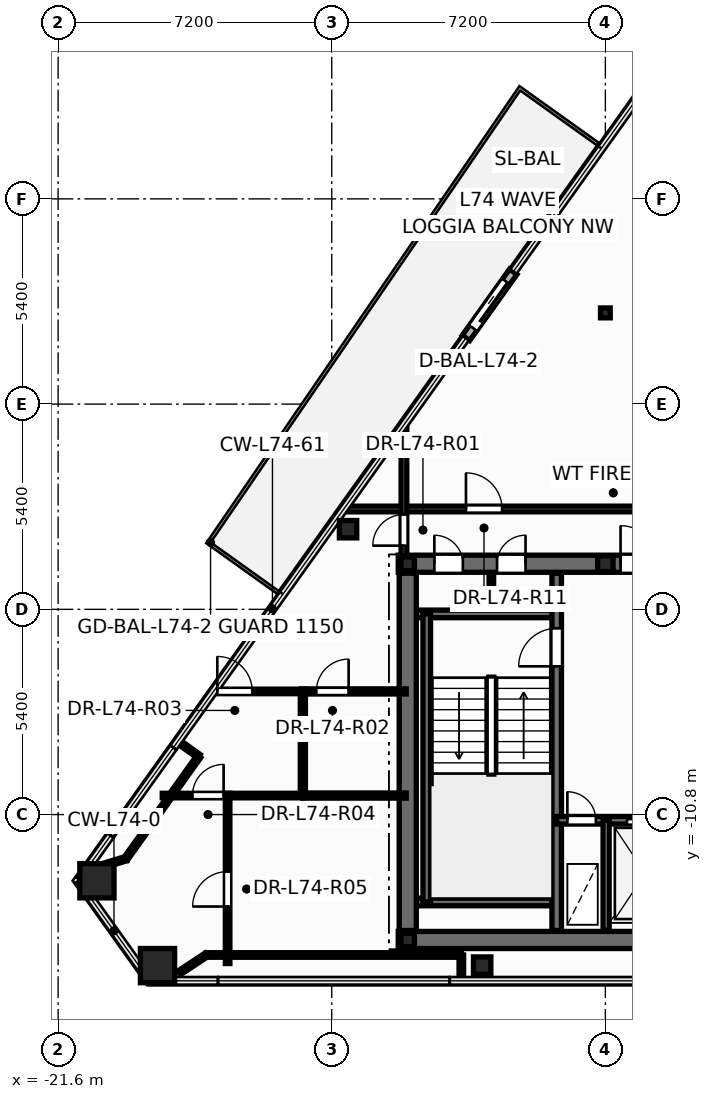
"""IFC4 building model, lengths in metres.
Left out: names, types, materials, properties, quantities, classifications, styles, units other than length and angle.
Written with IfcOpenShell. Run it as: python <this file> out.ifc"""

import sys

from ifc_helpers import new_model, si_unit, direction, frame, frame_2d, origin, origin_2d, place, context, subcontext, project, spatial, rectangle, hollow_rectangle, hollow_circle, i_section, extrude, element, fill, save


model = new_model("IFC4")
c1 = context("Model", 3, precision=1e-05, world=origin(), true_north=direction((0.0, 1.0)))
c2 = subcontext(c1, "Body", "Model", "MODEL_VIEW")
j1 = project(units=[si_unit("LENGTHUNIT", "METRE"), si_unit("PLANEANGLEUNIT", "RADIAN")], contexts=[c1])
p1 = place(None, origin())
s1 = spatial("IfcSite", under=j1, at=p1, CompositionType="ELEMENT")
p2 = place(p1, origin())
s2 = spatial("IfcBuilding", under=s1, at=p2, CompositionType="ELEMENT")
p3 = place(p2, frame((0.0, 0.0, 281.4)))
s3 = spatial("IfcBuildingStorey", under=s2, at=p3, CompositionType="ELEMENT", Elevation=281.4)
for number, where, z_axis, x_axis in (
    (1, (-20.579, -12.543, 0.0), (0.0, 0.0, 1.0), (1.0, 0.0, 0.0)),
    (2, (-18.985, -14.774, 0.0), (0.0, 0.0, 1.0), (1.0, 0.0, 0.0)),
):
    element("IfcColumn", number, at=place(p3, frame(where, z_axis=z_axis, x_axis=x_axis)), inside=s3, PredefinedType="COLUMN", context=c2, shape_type="SweptSolid", body=[
        extrude(hollow_rectangle(XDim=0.9, YDim=0.9, WallThickness=0.04, at=origin_2d()), origin(), (0.0, 0.0, 1.0), 3.6),
    ])
for number, where, z_axis, x_axis in (
    (3, (-10.442, -14.774, 0.0), (0.0, 0.0, 1.0), (1.0, 0.0, 0.0)),
    (4, (-8.306, 4.638, 0.0), (0.0, 0.0, 1.0), (1.0, 0.0, 0.0)),
    (5, (-13.97, -3.292, 0.0), (0.0, 0.0, 1.0), (1.0, 0.0, 0.0)),
):
    element("IfcColumn", number, at=place(p3, frame(where, z_axis=z_axis, x_axis=x_axis)), inside=s3, PredefinedType="COLUMN", context=c2, shape_type="SweptSolid", body=[
        extrude(hollow_circle(Radius=0.229, WallThickness=0.016, at=origin_2d()), origin(), (0.0, 0.0, 1.0), 3.6),
    ])
for number, where, z_axis, x_axis in (
    (6, (-12.4, -14.1, 0.0), (0.0, 0.0, 1.0), (1.0, 0.0, 0.0)),
    (7, (-12.4, -4.2, 0.0), (0.0, 0.0, 1.0), (1.0, 0.0, 0.0)),
):
    element("IfcColumn", number, at=place(p3, frame(where, z_axis=z_axis, x_axis=x_axis)), inside=s3, PredefinedType="COLUMN", context=c2, shape_type="SweptSolid", body=[
        extrude(i_section(OverallWidth=0.352, OverallDepth=0.359, WebThickness=0.018, FlangeThickness=0.026, at=origin_2d()), origin(), (0.0, 0.0, 1.0), 3.6),
    ])
p4 = place(p3, frame((-7.2, -4.2, 0.0), z_axis=(0.0, 0.0, 1.0), x_axis=(1.0, 0.0, 0.0)))
e8 = element("IfcColumn", 8, at=p4, inside=s3, PredefinedType="PILASTER", context=c2, shape_type="SweptSolid", body=[
    extrude(i_section(OverallWidth=0.405, OverallDepth=0.414, WebThickness=0.022, FlangeThickness=0.032, at=origin_2d()), origin(), (0.0, 0.0, 1.0), 3.6),
])
p5 = place(p3, frame((-7.2, 2.4, 0.0), z_axis=(0.0, 0.0, 1.0), x_axis=(1.0, 0.0, 0.0)))
e9 = element("IfcColumn", 9, at=p5, inside=s3, PredefinedType="COLUMN", context=c2, shape_type="SweptSolid", body=[
    extrude(i_section(OverallWidth=0.256, OverallDepth=0.26, WebThickness=0.01, FlangeThickness=0.017, at=origin_2d()), origin(), (0.0, 0.0, 1.0), 3.6),
])
p6 = place(p3, frame((-9.623, 3.482, -0.015), z_axis=(0.0, 0.0, 1.0), x_axis=(-0.581238193719, -0.813733471207, 0.0)))
e10 = element("IfcWall", 10, at=p6, inside=s3, PredefinedType="STANDARD", context=c2, shape_type="SweptSolid", body=[
    extrude(rectangle(XDim=2.14, YDim=0.24, at=frame_2d((1.07, 0.0))), origin(), (0.0, 0.0, 1.0), 2.853),
])
p7 = place(p6, frame((0.32, 0.0, 0.015)))
e11 = element("IfcOpeningElement", 11, at=p7, cuts=e10, PredefinedType="OPENING", context=c2, shape_type="SweptSolid", body=[
    extrude(rectangle(XDim=1.506, YDim=2.204, at=frame_2d((0.75, 1.102))), frame((0.0, 0.13, 0.0), z_axis=(0.0, -1.0, 0.0), x_axis=(1.0, 0.0, 0.0)), (0.0, 0.0, 1.0), 0.26),
])
p8 = place(p3, frame((-10.2, -5.52, 0.0), z_axis=(0.0, 0.0, 1.0), x_axis=(0.0, 1.0, 0.0)))
e12 = element("IfcWall", 12, at=p8, inside=s3, PredefinedType="PARTITIONING", context=c2, shape_type="SweptSolid", body=[
    extrude(rectangle(XDim=1.12, YDim=0.12, at=frame_2d((0.56, 0.0))), origin(), (0.0, 0.0, 1.0), 3.32),
])
p9 = place(p3, frame((-12.65, -14.1, 0.0), z_axis=(0.0, 0.0, 1.0), x_axis=(1.0, 0.0, 0.0)))
e13 = element("IfcWall", 13, at=p9, inside=s3, PredefinedType="SHEAR", context=c2, shape_type="SweptSolid", body=[
    extrude(rectangle(XDim=25.3, YDim=0.45, at=frame_2d((12.65, 0.0))), origin(), (0.0, 0.0, 1.0), 3.6),
])
p10 = place(p3, frame((-12.65, -4.2, 0.0), z_axis=(0.0, 0.0, 1.0), x_axis=(1.0, 0.0, 0.0)))
e14 = element("IfcWall", 14, at=p10, inside=s3, PredefinedType="SHEAR", context=c2, shape_type="SweptSolid", body=[
    extrude(rectangle(XDim=25.3, YDim=0.45, at=frame_2d((12.65, 0.0))), origin(), (0.0, 0.0, 1.0), 3.6),
])
p11 = place(p10, frame((0.95, 0.0, 0.0)))
e15 = element("IfcOpeningElement", 15, at=p11, cuts=e14, PredefinedType="OPENING", context=c2, shape_type="SweptSolid", body=[
    extrude(rectangle(XDim=0.756, YDim=2.054, at=frame_2d((0.375, 1.027))), frame((0.0, 0.235, 0.0), z_axis=(0.0, -1.0, 0.0), x_axis=(1.0, 0.0, 0.0)), (0.0, 0.0, 1.0), 0.47),
])
p12 = place(p10, frame((2.6, 0.0, 0.0)))
e16 = element("IfcOpeningElement", 16, at=p12, cuts=e14, PredefinedType="OPENING", context=c2, shape_type="SweptSolid", body=[
    extrude(rectangle(XDim=0.756, YDim=2.054, at=frame_2d((0.375, 1.027))), frame((0.0, 0.235, 0.0), z_axis=(0.0, -1.0, 0.0), x_axis=(1.0, 0.0, 0.0)), (0.0, 0.0, 1.0), 0.47),
])
p13 = place(p10, frame((21.85, 0.0, 0.0)))
e17 = element("IfcOpeningElement", 17, at=p13, cuts=e14, PredefinedType="OPENING", context=c2, shape_type="SweptSolid", body=[
    extrude(rectangle(XDim=0.756, YDim=2.054, at=frame_2d((0.375, 1.027))), frame((0.0, 0.235, 0.0), z_axis=(0.0, -1.0, 0.0), x_axis=(1.0, 0.0, 0.0)), (0.0, 0.0, 1.0), 0.47),
])
p14 = place(p10, frame((23.5, 0.0, 0.0)))
e18 = element("IfcOpeningElement", 18, at=p14, cuts=e14, PredefinedType="OPENING", context=c2, shape_type="SweptSolid", body=[
    extrude(rectangle(XDim=0.756, YDim=2.054, at=frame_2d((0.375, 1.027))), frame((0.0, 0.235, 0.0), z_axis=(0.0, -1.0, 0.0), x_axis=(1.0, 0.0, 0.0)), (0.0, 0.0, 1.0), 0.47),
])
p15 = place(p10, frame((5.85, 0.0, 0.0)))
e19 = element("IfcOpeningElement", 19, at=p15, cuts=e14, PredefinedType="OPENING", context=c2, shape_type="SweptSolid", body=[
    extrude(rectangle(XDim=1.006, YDim=2.104, at=frame_2d((0.5, 1.052))), frame((0.0, 0.235, 0.0), z_axis=(0.0, -1.0, 0.0), x_axis=(1.0, 0.0, 0.0)), (0.0, 0.0, 1.0), 0.47),
])
p16 = place(p10, frame((10.35, 0.0, 0.0)))
e20 = element("IfcOpeningElement", 20, at=p16, cuts=e14, PredefinedType="OPENING", context=c2, shape_type="SweptSolid", body=[
    extrude(rectangle(XDim=1.406, YDim=2.154, at=frame_2d((0.7, 1.077))), frame((0.0, 0.235, 0.0), z_axis=(0.0, -1.0, 0.0), x_axis=(1.0, 0.0, 0.0)), (0.0, 0.0, 1.0), 0.47),
])
p17 = place(p10, frame((18.45, 0.0, 0.0)))
e21 = element("IfcOpeningElement", 21, at=p17, cuts=e14, PredefinedType="OPENING", context=c2, shape_type="SweptSolid", body=[
    extrude(rectangle(XDim=1.006, YDim=2.104, at=frame_2d((0.5, 1.052))), frame((0.0, 0.235, 0.0), z_axis=(0.0, -1.0, 0.0), x_axis=(1.0, 0.0, 0.0)), (0.0, 0.0, 1.0), 0.47),
])
for number, where, z_axis, x_axis in (
    (22, (-12.35, -5.52, 0.0), (0.0, 0.0, 1.0), (1.0, 0.0, 0.0)),
    (23, (-12.35, -13.1, 0.0), (0.0, 0.0, 1.0), (1.0, 0.0, 0.0)),
):
    element("IfcWall", number, at=place(p3, frame(where, z_axis=z_axis, x_axis=x_axis)), inside=s3, PredefinedType="SOLIDWALL", context=c2, shape_type="SweptSolid", body=[
        extrude(rectangle(XDim=3.87, YDim=0.2, at=frame_2d((1.935, 0.0))), origin(), (0.0, 0.0, 1.0), 3.6),
    ])
p18 = place(p3, frame((-11.9, -13.1, 0.0), z_axis=(0.0, 0.0, 1.0), x_axis=(0.0, 1.0, 0.0)))
e24 = element("IfcWall", 24, at=p18, inside=s3, PredefinedType="SOLIDWALL", context=c2, shape_type="SweptSolid", body=[
    extrude(rectangle(XDim=7.58, YDim=0.2, at=frame_2d((3.79, 0.0))), origin(), (0.0, 0.0, 1.0), 3.6),
])
p19 = place(p3, frame((-8.48, -13.85, 0.0), z_axis=(0.0, 0.0, 1.0), x_axis=(0.0, 1.0, 0.0)))
e25 = element("IfcWall", 25, at=p19, inside=s3, PredefinedType="SHEAR", context=c2, shape_type="SweptSolid", body=[
    extrude(rectangle(XDim=9.4, YDim=0.25, at=frame_2d((4.7, 0.0))), origin(), (0.0, 0.0, 1.0), 3.6),
])
p20 = place(p19, frame((6.95, 0.0, 0.0)))
e26 = element("IfcOpeningElement", 26, at=p20, cuts=e25, PredefinedType="OPENING", context=c2, shape_type="SweptSolid", body=[
    extrude(rectangle(XDim=1.006, YDim=2.104, at=frame_2d((0.5, 1.052))), frame((0.0, 0.135, 0.0), z_axis=(0.0, -1.0, 0.0), x_axis=(1.0, 0.0, 0.0)), (0.0, 0.0, 1.0), 0.27),
])
p21 = place(p3, frame((-8.48, -10.95, 0.0), z_axis=(0.0, 0.0, 1.0), x_axis=(1.0, 0.0, 0.0)))
e27 = element("IfcWall", 27, at=p21, inside=s3, PredefinedType="SOLIDWALL", context=c2, shape_type="SweptSolid", body=[
    extrude(rectangle(XDim=3.36, YDim=0.2, at=frame_2d((1.68, 0.0))), origin(), (0.0, 0.0, 1.0), 3.6),
])
p22 = place(p21, frame((0.28, 0.0, 0.0)))
e28 = element("IfcOpeningElement", 28, at=p22, cuts=e27, PredefinedType="OPENING", context=c2, shape_type="SweptSolid", body=[
    extrude(rectangle(XDim=0.756, YDim=2.054, at=frame_2d((0.375, 1.027))), frame((0.0, 0.11, 0.0), z_axis=(0.0, -1.0, 0.0), x_axis=(1.0, 0.0, 0.0)), (0.0, 0.0, 1.0), 0.22),
])
p23 = place(p21, frame((1.85, 0.0, 0.0)))
e29 = element("IfcOpeningElement", 29, at=p23, cuts=e27, PredefinedType="OPENING", context=c2, shape_type="SweptSolid", body=[
    extrude(rectangle(XDim=1.106, YDim=2.104, at=frame_2d((0.55, 1.052))), frame((0.0, 0.11, 0.0), z_axis=(0.0, -1.0, 0.0), x_axis=(1.0, 0.0, 0.0)), (0.0, 0.0, 1.0), 0.22),
])
p24 = place(p3, frame((-7.18, -13.85, 0.0), z_axis=(0.0, 0.0, 1.0), x_axis=(0.0, 1.0, 0.0)))
e30 = element("IfcWall", 30, at=p24, inside=s3, PredefinedType="PARTITIONING", context=c2, shape_type="SweptSolid", body=[
    extrude(rectangle(XDim=2.9, YDim=0.16, at=frame_2d((1.45, 0.0))), origin(), (0.0, 0.0, 1.0), 2.545),
])
p25 = place(p3, frame((-12.4, -13.85, 0.0), z_axis=(0.0, 0.0, 1.0), x_axis=(0.0, 1.0, 0.0)))
e31 = element("IfcWall", 31, at=p25, inside=s3, PredefinedType="SHEAR", context=c2, shape_type="SweptSolid", body=[
    extrude(rectangle(XDim=9.4, YDim=0.45, at=frame_2d((4.7, 0.0))), origin(), (0.0, 0.0, 1.0), 3.6),
])
p26 = place(p3, frame((-14.082, -2.76, 0.0), z_axis=(0.0, 0.0, 1.0), x_axis=(1.0, 0.0, 0.0)))
e32 = element("IfcWall", 32, at=p26, inside=s3, PredefinedType="PARTITIONING", context=c2, shape_type="SweptSolid", body=[
    extrude(rectangle(XDim=8.342, YDim=0.15, at=frame_2d((4.171, 0.0))), origin(), (0.0, 0.0, 1.0), 2.295),
])
p27 = place(p26, frame((3.214, 0.0, 0.0)))
e33 = element("IfcOpeningElement", 33, at=p27, cuts=e32, PredefinedType="OPENING", context=c2, shape_type="SweptSolid", body=[
    extrude(rectangle(XDim=0.956, YDim=2.104, at=frame_2d((0.475, 1.052))), frame((0.0, 0.085, 0.0), z_axis=(0.0, -1.0, 0.0), x_axis=(1.0, 0.0, 0.0)), (0.0, 0.0, 1.0), 0.17),
])
p28 = place(p3, frame((-17.701, -14.494, 0.0), z_axis=(0.0, 0.0, 1.0), x_axis=(1.0, 0.0, 0.0)))
e34 = element("IfcWall", 34, at=p28, inside=s3, PredefinedType="PARTITIONING", context=c2, shape_type="SweptSolid", body=[
    extrude(rectangle(XDim=6.712, YDim=0.12, at=frame_2d((3.356, 0.0))), origin(), (0.0, 0.0, 1.0), 2.838),
])
p29 = place(p3, frame((-17.14, -14.72, 0.0), z_axis=(0.0, 0.0, 1.0), x_axis=(0.0, 1.0, 0.0)))
e35 = element("IfcWall", 35, at=p29, inside=s3, PredefinedType="PARTITIONING", context=c2, shape_type="SweptSolid", body=[
    extrude(rectangle(XDim=4.42, YDim=0.12, at=frame_2d((2.21, 0.0))), origin(), (0.0, 0.0, 1.0), 3.32),
])
p30 = place(p29, frame((1.5, 0.0, 0.0)))
e36 = element("IfcOpeningElement", 36, at=p30, cuts=e35, PredefinedType="OPENING", context=c2, shape_type="SweptSolid", body=[
    extrude(rectangle(XDim=0.926, YDim=2.104, at=frame_2d((0.46, 1.052))), frame((0.0, 0.07, 0.0), z_axis=(0.0, -1.0, 0.0), x_axis=(1.0, 0.0, 0.0)), (0.0, 0.0, 1.0), 0.14),
])
p31 = place(p3, frame((-12.5, -4.24, 0.0), z_axis=(0.0, 0.0, 1.0), x_axis=(0.0, 1.0, 0.0)))
e37 = element("IfcWall", 37, at=p31, inside=s3, PredefinedType="PARTITIONING", context=c2, shape_type="SweptSolid", body=[
    extrude(rectangle(XDim=3.695, YDim=0.15, at=frame_2d((1.848, 0.0))), origin(), (0.0, 0.0, 1.0), 2.295),
])
p32 = place(p31, frame((0.516, 0.0, 0.0)))
e38 = element("IfcOpeningElement", 38, at=p32, cuts=e37, PredefinedType="OPENING", context=c2, shape_type="SweptSolid", body=[
    extrude(rectangle(XDim=0.826, YDim=2.104, at=frame_2d((0.41, 1.052))), frame((0.0, 0.085, 0.0), z_axis=(0.0, -1.0, 0.0), x_axis=(1.0, 0.0, 0.0)), (0.0, 0.0, 1.0), 0.17),
])
p33 = place(p3, frame((-17.896, -9.268, 0.0), z_axis=(0.0, 0.0, 1.0), x_axis=(-0.581300979527, -0.813688620543, 0.0)))
e39 = element("IfcWall", 39, at=p33, inside=s3, PredefinedType="PARTITIONING", context=c2, shape_type="SweptSolid", body=[
    extrude(rectangle(XDim=3.31, YDim=0.12, at=frame_2d((1.655, 0.0))), origin(), (0.0, 0.0, 1.0), 2.295),
])
p34 = place(p3, frame((-15.2, -7.56, 0.0), z_axis=(0.0, 0.0, 1.0), x_axis=(1.0, 0.0, 0.0)))
e40 = element("IfcWall", 40, at=p34, inside=s3, PredefinedType="PARTITIONING", context=c2, shape_type="SweptSolid", body=[
    extrude(rectangle(XDim=2.76, YDim=0.135, at=frame_2d((1.38, 0.0))), origin(), (0.0, 0.0, 1.0), 2.838),
])
p35 = place(p34, frame((0.394, 0.0, 0.0)))
e41 = element("IfcOpeningElement", 41, at=p35, cuts=e40, PredefinedType="OPENING", context=c2, shape_type="SweptSolid", body=[
    extrude(rectangle(XDim=0.856, YDim=2.104, at=frame_2d((0.425, 1.052))), frame((0.0, 0.078, 0.0), z_axis=(0.0, -1.0, 0.0), x_axis=(1.0, 0.0, 0.0)), (0.0, 0.0, 1.0), 0.155),
])
p36 = place(p3, frame((-15.16, -10.3, 0.0), z_axis=(0.0, 0.0, 1.0), x_axis=(0.0, 1.0, 0.0)))
e42 = element("IfcWall", 42, at=p36, inside=s3, PredefinedType="PARTITIONING", context=c2, shape_type="SweptSolid", body=[
    extrude(rectangle(XDim=2.74, YDim=0.135, at=frame_2d((1.37, 0.0))), origin(), (0.0, 0.0, 1.0), 3.32),
])
p37 = place(p3, frame((-15.16, -10.3, 0.0), z_axis=(0.0, 0.0, 1.0), x_axis=(1.0, 0.0, 0.0)))
e43 = element("IfcWall", 43, at=p37, inside=s3, PredefinedType="PARTITIONING", context=c2, shape_type="SweptSolid", body=[
    extrude(rectangle(XDim=2.72, YDim=0.135, at=frame_2d((1.36, 0.0))), origin(), (0.0, 0.0, 1.0), 2.838),
])
p38 = place(p3, frame((-17.511, -7.56, 0.0), z_axis=(0.0, 0.0, 1.0), x_axis=(1.0, 0.0, 0.0)))
e44 = element("IfcWall", 44, at=p38, inside=s3, PredefinedType="PARTITIONING", context=c2, shape_type="SweptSolid", body=[
    extrude(rectangle(XDim=2.431, YDim=0.12, at=frame_2d((1.215, 0.0))), origin(), (0.0, 0.0, 1.0), 2.295),
])
p39 = place(p38, frame((0.1, 0.0, 0.0)))
e45 = element("IfcOpeningElement", 45, at=p39, cuts=e44, PredefinedType="OPENING", context=c2, shape_type="SweptSolid", body=[
    extrude(rectangle(XDim=0.926, YDim=2.104, at=frame_2d((0.46, 1.052))), frame((0.0, 0.07, 0.0), z_axis=(0.0, -1.0, 0.0), x_axis=(1.0, 0.0, 0.0)), (0.0, 0.0, 1.0), 0.14),
])
p40 = place(p3, frame((-17.2, -10.3, 0.0), z_axis=(0.0, 0.0, 1.0), x_axis=(1.0, 0.0, 0.0)))
e46 = element("IfcWall", 46, at=p40, inside=s3, PredefinedType="PARTITIONING", context=c2, shape_type="SweptSolid", body=[
    extrude(rectangle(XDim=2.04, YDim=0.12, at=frame_2d((1.02, 0.0))), origin(), (0.0, 0.0, 1.0), 3.32),
])
p41 = place(p3, frame((-18.86, -10.3, 0.0), z_axis=(0.0, 0.0, 1.0), x_axis=(1.0, 0.0, 0.0)))
e47 = element("IfcWall", 47, at=p41, inside=s3, PredefinedType="PARTITIONING", context=c2, shape_type="SweptSolid", body=[
    extrude(rectangle(XDim=1.78, YDim=0.12, at=frame_2d((0.89, 0.0))), origin(), (0.0, 0.0, 1.0), 2.295),
])
p42 = place(p41, frame((0.795, 0.0, 0.0)))
e48 = element("IfcOpeningElement", 48, at=p42, cuts=e47, PredefinedType="OPENING", context=c2, shape_type="SweptSolid", body=[
    extrude(rectangle(XDim=0.826, YDim=2.104, at=frame_2d((0.41, 1.052))), frame((0.0, 0.07, 0.0), z_axis=(0.0, -1.0, 0.0), x_axis=(1.0, 0.0, 0.0)), (0.0, 0.0, 1.0), 0.14),
])
p43 = place(p3, frame((-18.416, -14.965, 0.0), z_axis=(0.0, 0.0, 1.0), x_axis=(0.83506849916, 0.550145982182, 0.0)))
e49 = element("IfcWall", 49, at=p43, inside=s3, PredefinedType="PARTITIONING", context=c2, shape_type="SweptSolid", body=[
    extrude(rectangle(XDim=0.855, YDim=0.12, at=frame_2d((0.428, 0.0))), origin(), (0.0, 0.0, 1.0), 2.838),
])
p44 = place(p3, frame((-19.82, -11.962, 0.0), z_axis=(0.0, 0.0, 1.0), x_axis=(-0.956124750871, -0.292959827915, 0.0)))
e50 = element("IfcWall", 50, at=p44, inside=s3, PredefinedType="PARTITIONING", context=c2, shape_type="SweptSolid", body=[
    extrude(rectangle(XDim=0.853, YDim=0.12, at=frame_2d((0.427, 0.0))), origin(), (0.0, 0.0, 1.0), 2.295),
])
p45 = place(p3, frame((-10.99, -14.494, 0.0), z_axis=(0.0, 0.0, 1.0), x_axis=(0.0, -1.0, 0.0)))
e51 = element("IfcWall", 51, at=p45, inside=s3, PredefinedType="PARTITIONING", context=c2, shape_type="SweptSolid", body=[
    extrude(rectangle(XDim=0.67, YDim=0.12, at=frame_2d((0.335, 0.0))), origin(), (0.0, 0.0, 1.0), 2.838),
])
p46 = place(p3, frame((-18.441, -8.879, 0.0), z_axis=(0.0, 0.0, 1.0), x_axis=(0.81385652885, -0.581065874448, 0.0)))
e52 = element("IfcWall", 52, at=p46, inside=s3, PredefinedType="PARTITIONING", context=c2, shape_type="SweptSolid", body=[
    extrude(rectangle(XDim=0.67, YDim=0.12, at=frame_2d((0.335, 0.0))), origin(), (0.0, 0.0, 1.0), 2.838),
])
p47 = place(p7, origin())
e53 = element("IfcDoor", 53, at=p47, inside=s3, OperationType="SLIDING_TO_RIGHT", PredefinedType="DOOR", context=c2, shape_type="SweptSolid", body=[
    extrude(rectangle(XDim=1.5, YDim=2.2, at=frame_2d((0.75, 1.1))), frame((0.0, 0.025, 0.0), z_axis=(0.0, -1.0, 0.0), x_axis=(1.0, 0.0, 0.0)), (0.0, 0.0, 1.0), 0.05),
])
fill(e11, e53)
p48 = place(p20, origin())
e54 = element("IfcDoor", 54, at=p48, inside=s3, OperationType="SINGLE_SWING_LEFT", PredefinedType="DOOR", context=c2, shape_type="SweptSolid", body=[
    extrude(rectangle(XDim=1.0, YDim=2.1, at=frame_2d((0.5, 1.05))), frame((0.0, 0.025, 0.0), z_axis=(0.0, -1.0, 0.0), x_axis=(1.0, 0.0, 0.0)), (0.0, 0.0, 1.0), 0.05),
])
fill(e26, e54)
p49 = place(p22, origin())
e55 = element("IfcDoor", 55, at=p49, inside=s3, OperationType="SINGLE_SWING_LEFT", PredefinedType="DOOR", context=c2, shape_type="SweptSolid", body=[
    extrude(rectangle(XDim=0.75, YDim=2.05, at=frame_2d((0.375, 1.025))), frame((0.0, 0.025, 0.0), z_axis=(0.0, -1.0, 0.0), x_axis=(1.0, 0.0, 0.0)), (0.0, 0.0, 1.0), 0.05),
])
fill(e28, e55)
p50 = place(p23, origin())
e56 = element("IfcDoor", 56, at=p50, inside=s3, OperationType="DOUBLE_DOOR_SLIDING", PredefinedType="DOOR", context=c2, shape_type="SweptSolid", body=[
    extrude(rectangle(XDim=1.1, YDim=2.1, at=frame_2d((0.55, 1.05))), frame((0.0, 0.025, 0.0), z_axis=(0.0, -1.0, 0.0), x_axis=(1.0, 0.0, 0.0)), (0.0, 0.0, 1.0), 0.05),
])
fill(e29, e56)
p51 = place(p11, origin())
e57 = element("IfcDoor", 57, at=p51, inside=s3, OperationType="SINGLE_SWING_LEFT", PredefinedType="DOOR", context=c2, shape_type="SweptSolid", body=[
    extrude(rectangle(XDim=0.75, YDim=2.05, at=frame_2d((0.375, 1.025))), frame((0.0, 0.025, 0.0), z_axis=(0.0, -1.0, 0.0), x_axis=(1.0, 0.0, 0.0)), (0.0, 0.0, 1.0), 0.05),
])
fill(e15, e57)
p52 = place(p12, origin())
e58 = element("IfcDoor", 58, at=p52, inside=s3, OperationType="SINGLE_SWING_RIGHT", PredefinedType="DOOR", context=c2, shape_type="SweptSolid", body=[
    extrude(rectangle(XDim=0.75, YDim=2.05, at=frame_2d((0.375, 1.025))), frame((0.0, 0.025, 0.0), z_axis=(0.0, -1.0, 0.0), x_axis=(1.0, 0.0, 0.0)), (0.0, 0.0, 1.0), 0.05),
])
fill(e16, e58)
p53 = place(p15, origin())
e59 = element("IfcDoor", 59, at=p53, inside=s3, OperationType="SINGLE_SWING_LEFT", PredefinedType="DOOR", context=c2, shape_type="SweptSolid", body=[
    extrude(rectangle(XDim=1.0, YDim=2.1, at=frame_2d((0.5, 1.05))), frame((0.0, 0.025, 0.0), z_axis=(0.0, -1.0, 0.0), x_axis=(1.0, 0.0, 0.0)), (0.0, 0.0, 1.0), 0.05),
])
fill(e19, e59)
p54 = place(p32, origin())
e60 = element("IfcDoor", 60, at=p54, inside=s3, OperationType="SINGLE_SWING_LEFT", PredefinedType="DOOR", context=c2, shape_type="SweptSolid", body=[
    extrude(rectangle(XDim=0.82, YDim=2.1, at=frame_2d((0.41, 1.05))), frame((0.0, 0.025, 0.0), z_axis=(0.0, -1.0, 0.0), x_axis=(1.0, 0.0, 0.0)), (0.0, 0.0, 1.0), 0.05),
])
fill(e38, e60)
p55 = place(p35, origin())
e61 = element("IfcDoor", 61, at=p55, inside=s3, OperationType="SINGLE_SWING_RIGHT", PredefinedType="DOOR", context=c2, shape_type="SweptSolid", body=[
    extrude(rectangle(XDim=0.85, YDim=2.1, at=frame_2d((0.425, 1.05))), frame((0.0, 0.025, 0.0), z_axis=(0.0, -1.0, 0.0), x_axis=(1.0, 0.0, 0.0)), (0.0, 0.0, 1.0), 0.05),
])
fill(e41, e61)
p56 = place(p39, origin())
e62 = element("IfcDoor", 62, at=p56, inside=s3, OperationType="SINGLE_SWING_LEFT", PredefinedType="DOOR", context=c2, shape_type="SweptSolid", body=[
    extrude(rectangle(XDim=0.92, YDim=2.1, at=frame_2d((0.46, 1.05))), frame((0.0, 0.025, 0.0), z_axis=(0.0, -1.0, 0.0), x_axis=(1.0, 0.0, 0.0)), (0.0, 0.0, 1.0), 0.05),
])
fill(e45, e62)
p57 = place(p42, origin())
e63 = element("IfcDoor", 63, at=p57, inside=s3, OperationType="SINGLE_SWING_RIGHT", PredefinedType="DOOR", context=c2, shape_type="SweptSolid", body=[
    extrude(rectangle(XDim=0.82, YDim=2.1, at=frame_2d((0.41, 1.05))), frame((0.0, 0.025, 0.0), z_axis=(0.0, -1.0, 0.0), x_axis=(1.0, 0.0, 0.0)), (0.0, 0.0, 1.0), 0.05),
])
fill(e48, e63)
p58 = place(p30, origin())
e64 = element("IfcDoor", 64, at=p58, inside=s3, OperationType="SINGLE_SWING_LEFT", PredefinedType="DOOR", context=c2, shape_type="SweptSolid", body=[
    extrude(rectangle(XDim=0.92, YDim=2.1, at=frame_2d((0.46, 1.05))), frame((0.0, 0.025, 0.0), z_axis=(0.0, -1.0, 0.0), x_axis=(1.0, 0.0, 0.0)), (0.0, 0.0, 1.0), 0.05),
])
fill(e36, e64)
p59 = place(p27, origin())
e65 = element("IfcDoor", 65, at=p59, inside=s3, OperationType="SINGLE_SWING_LEFT", PredefinedType="DOOR", context=c2, shape_type="SweptSolid", body=[
    extrude(rectangle(XDim=0.95, YDim=2.1, at=frame_2d((0.475, 1.05))), frame((0.0, 0.025, 0.0), z_axis=(0.0, -1.0, 0.0), x_axis=(1.0, 0.0, 0.0)), (0.0, 0.0, 1.0), 0.05),
])
fill(e33, e65)
save(model, sys.argv[1])
